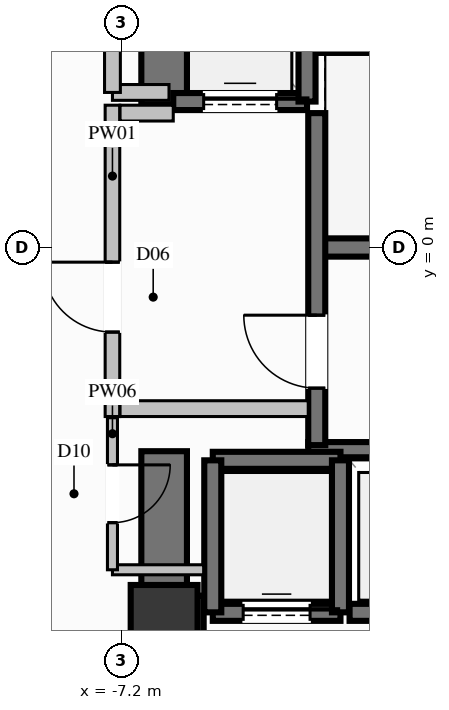
"""IFC4 building model, lengths in metres.
Left out: names, types, materials, properties, quantities, classifications, styles, units other than length and angle.
Written with IfcOpenShell. Run it as: python <this file> out.ifc"""

import sys

from ifc_helpers import new_model, si_unit, direction, frame, frame_2d, origin, origin_2d, place, context, subcontext, project, spatial, rectangle, extrude, element, fill, save


model = new_model("IFC4")
c1 = context("Model", 3, precision=1e-05, world=origin(), true_north=direction((0.0, 1.0)))
c2 = subcontext(c1, "Body", "Model", "MODEL_VIEW")
j1 = project(units=[si_unit("LENGTHUNIT", "METRE"), si_unit("PLANEANGLEUNIT", "RADIAN")], contexts=[c1])
p1 = place(None, origin())
s1 = spatial("IfcSite", under=j1, at=p1, CompositionType="ELEMENT")
p2 = place(p1, origin())
s2 = spatial("IfcBuilding", under=s1, at=p2, CompositionType="ELEMENT")
p3 = place(p2, frame((0.0, 0.0, 57.2)))
s3 = spatial("IfcBuildingStorey", under=s2, at=p3, CompositionType="ELEMENT", Elevation=57.2)
p4 = place(p3, frame((-6.5, -6.1, 0.0), z_axis=(0.0, 0.0, 1.0), x_axis=(1.0, 0.0, 0.0)))
e1 = element("IfcColumn", 1, at=p4, inside=s3, PredefinedType="COLUMN", context=c2, shape_type="SweptSolid", body=[
    extrude(rectangle(XDim=1.1, YDim=1.1, at=origin_2d()), origin(), (0.0, 0.0, 1.0), 3.6),
])
p5 = place(p3, frame((-3.99, 0.0, 0.0), z_axis=(0.0, 0.0, 1.0), x_axis=(1.0, 0.0, 0.0)))
e2 = element("IfcWall", 2, at=p5, inside=s3, PredefinedType="SHEAR", context=c2, shape_type="SweptSolid", body=[
    extrude(rectangle(XDim=7.98, YDim=0.3, at=frame_2d((3.99, 0.0))), origin(), (0.0, 0.0, 1.0), 3.6),
])
for number, where, z_axis, x_axis in (
    (3, (-4.13, -3.325, 0.0), (0.0, 0.0, 1.0), (1.0, 0.0, 0.0)),
    (4, (-4.13, 3.325, 0.0), (0.0, 0.0, 1.0), (1.0, 0.0, 0.0)),
):
    element("IfcWall", number, at=place(p3, frame(where, z_axis=z_axis, x_axis=x_axis)), inside=s3, PredefinedType="SOLIDWALL", context=c2, shape_type="SweptSolid", body=[
        extrude(rectangle(XDim=8.26, YDim=0.25, at=frame_2d((4.13, 0.0))), origin(), (0.0, 0.0, 1.0), 3.6),
    ])
p6 = place(p3, frame((-6.125, -6.1, 0.0), z_axis=(0.0, 0.0, 1.0), x_axis=(1.0, 0.0, 0.0)))
e5 = element("IfcWall", 5, at=p6, inside=s3, PredefinedType="SHEAR", context=c2, shape_type="SweptSolid", body=[
    extrude(rectangle(XDim=0.275, YDim=0.75, at=frame_2d((0.137, 0.0))), origin(), (0.0, 0.0, 1.0), 3.6),
])
p7 = place(p3, frame((-6.5, 2.35, 0.0), z_axis=(0.0, 0.0, 1.0), x_axis=(0.0, 1.0, 0.0)))
e6 = element("IfcWall", 6, at=p7, inside=s3, PredefinedType="SHEAR", context=c2, shape_type="SweptSolid", body=[
    extrude(rectangle(XDim=4.125, YDim=0.75, at=frame_2d((2.062, 0.0))), origin(), (0.0, 0.0, 1.0), 3.6),
])
p8 = place(p3, frame((-6.5, -6.475, 0.0), z_axis=(0.0, 0.0, 1.0), x_axis=(0.0, 1.0, 0.0)))
e7 = element("IfcWall", 7, at=p8, inside=s3, PredefinedType="SHEAR", context=c2, shape_type="SweptSolid", body=[
    extrude(rectangle(XDim=3.125, YDim=0.75, at=frame_2d((1.562, 0.0))), origin(), (0.0, 0.0, 1.0), 3.6),
])
p9 = place(p3, frame((-5.7, -6.0, 0.0), z_axis=(0.0, 0.0, 1.0), x_axis=(1.0, 0.0, 0.0)))
e8 = element("IfcWall", 8, at=p9, inside=s3, PredefinedType="SOLIDWALL", context=c2, shape_type="SweptSolid", body=[
    extrude(rectangle(XDim=2.1, YDim=0.28, at=frame_2d((1.05, 0.0))), origin(), (0.0, 0.0, 1.0), 3.34),
])
p10 = place(p9, frame((0.5, 0.0, 0.0)))
e9 = element("IfcOpeningElement", 9, at=p10, cuts=e8, PredefinedType="OPENING", context=c2, shape_type="SweptSolid", body=[
    extrude(rectangle(XDim=1.1, YDim=2.2, at=frame_2d((0.55, 1.1))), frame((0.0, 0.15, 0.0), z_axis=(0.0, -1.0, 0.0), x_axis=(1.0, 0.0, 0.0)), (0.0, 0.0, 1.0), 0.3),
])
p11 = place(p3, frame((-3.6, -3.5, 0.0), z_axis=(0.0, 0.0, 1.0), x_axis=(-1.0, 0.0, 0.0)))
e10 = element("IfcWall", 10, at=p11, inside=s3, PredefinedType="SOLIDWALL", context=c2, shape_type="SweptSolid", body=[
    extrude(rectangle(XDim=2.1, YDim=0.28, at=frame_2d((1.05, 0.0))), origin(), (0.0, 0.0, 1.0), 3.34),
])
for number, where, z_axis, x_axis in (
    (11, (-5.7, -3.5, 0.0), (0.0, 0.0, 1.0), (0.0, -1.0, 0.0)),
    (12, (-3.6, -6.0, 0.0), (0.0, 0.0, 1.0), (0.0, 1.0, 0.0)),
):
    element("IfcWall", number, at=place(p3, frame(where, z_axis=z_axis, x_axis=x_axis)), inside=s3, PredefinedType="SOLIDWALL", context=c2, shape_type="SweptSolid", body=[
        extrude(rectangle(XDim=2.5, YDim=0.28, at=frame_2d((1.25, 0.0))), origin(), (0.0, 0.0, 1.0), 3.34),
    ])
p12 = place(p3, frame((-3.45, -6.0, 0.0), z_axis=(0.0, 0.0, 1.0), x_axis=(1.0, 0.0, 0.0)))
e13 = element("IfcWall", 13, at=p12, inside=s3, PredefinedType="SOLIDWALL", context=c2, shape_type="SweptSolid", body=[
    extrude(rectangle(XDim=2.1, YDim=0.28, at=frame_2d((1.05, 0.0))), origin(), (0.0, 0.0, 1.0), 3.34),
])
p13 = place(p12, frame((0.5, 0.0, 0.0)))
e14 = element("IfcOpeningElement", 14, at=p13, cuts=e13, PredefinedType="OPENING", context=c2, shape_type="SweptSolid", body=[
    extrude(rectangle(XDim=1.1, YDim=2.2, at=frame_2d((0.55, 1.1))), frame((0.0, 0.15, 0.0), z_axis=(0.0, -1.0, 0.0), x_axis=(1.0, 0.0, 0.0)), (0.0, 0.0, 1.0), 0.3),
])
p14 = place(p3, frame((-6.35, 2.4, 0.0), z_axis=(0.0, 0.0, 1.0), x_axis=(1.0, 0.0, 0.0)))
e15 = element("IfcWall", 15, at=p14, inside=s3, PredefinedType="SOLIDWALL", context=c2, shape_type="SweptSolid", body=[
    extrude(rectangle(XDim=2.2, YDim=0.28, at=frame_2d((1.1, 0.0))), origin(), (0.0, 0.0, 1.0), 3.34),
])
p15 = place(p14, frame((0.5, 0.0, 0.0)))
e16 = element("IfcOpeningElement", 16, at=p15, cuts=e15, PredefinedType="OPENING", context=c2, shape_type="SweptSolid", body=[
    extrude(rectangle(XDim=1.2, YDim=2.2, at=frame_2d((0.6, 1.1))), frame((0.0, 0.15, 0.0), z_axis=(0.0, -1.0, 0.0), x_axis=(1.0, 0.0, 0.0)), (0.0, 0.0, 1.0), 0.3),
])
p16 = place(p3, frame((-4.15, 2.4, 0.0), z_axis=(0.0, 0.0, 1.0), x_axis=(0.0, 1.0, 0.0)))
e17 = element("IfcWall", 17, at=p16, inside=s3, PredefinedType="SOLIDWALL", context=c2, shape_type="SweptSolid", body=[
    extrude(rectangle(XDim=2.7, YDim=0.28, at=frame_2d((1.35, 0.0))), origin(), (0.0, 0.0, 1.0), 3.34),
])
p17 = place(p3, frame((-3.99, -3.25, 0.0), z_axis=(0.0, 0.0, 1.0), x_axis=(0.0, 1.0, 0.0)))
e18 = element("IfcWall", 18, at=p17, inside=s3, PredefinedType="SOLIDWALL", context=c2, shape_type="SweptSolid", body=[
    extrude(rectangle(XDim=5.46, YDim=0.28, at=frame_2d((2.73, 0.0))), origin(), (0.0, 0.0, 1.0), 3.34),
])
p18 = place(p17, frame((0.937, 0.0, 0.0)))
e19 = element("IfcOpeningElement", 19, at=p18, cuts=e18, PredefinedType="OPENING", context=c2, shape_type="SweptSolid", body=[
    extrude(rectangle(XDim=1.2, YDim=2.2, at=frame_2d((0.6, 1.1))), frame((0.0, 0.15, 0.0), z_axis=(0.0, -1.0, 0.0), x_axis=(1.0, 0.0, 0.0)), (0.0, 0.0, 1.0), 0.3),
])
p19 = place(p3, frame((-7.35, -2.78, 0.0), z_axis=(0.0, 0.0, 1.0), x_axis=(0.0, 1.0, 0.0)))
e20 = element("IfcWall", 20, at=p19, inside=s3, PredefinedType="PARTITIONING", context=c2, shape_type="SweptSolid", body=[
    extrude(rectangle(XDim=5.12, YDim=0.24, at=frame_2d((2.56, 0.0))), origin(), (0.0, 0.0, 1.0), 2.425),
])
p20 = place(p19, frame((1.389, 0.0, 0.0)))
e21 = element("IfcOpeningElement", 21, at=p20, cuts=e20, PredefinedType="OPENING", context=c2, shape_type="SweptSolid", body=[
    extrude(rectangle(XDim=1.15, YDim=2.2, at=frame_2d((0.575, 1.1))), frame((0.0, 0.13, 0.0), z_axis=(0.0, -1.0, 0.0), x_axis=(1.0, 0.0, 0.0)), (0.0, 0.0, 1.0), 0.26),
])
p21 = place(p3, frame((-7.225, -2.65, 0.0), z_axis=(0.0, 0.0, 1.0), x_axis=(1.0, 0.0, 0.0)))
e22 = element("IfcWall", 22, at=p21, inside=s3, PredefinedType="PARTITIONING", context=c2, shape_type="SweptSolid", body=[
    extrude(rectangle(XDim=3.095, YDim=0.26, at=frame_2d((1.548, 0.0))), origin(), (0.0, 0.0, 1.0), 3.34),
])
p22 = place(p3, frame((-7.225, 2.21, 0.0), z_axis=(0.0, 0.0, 1.0), x_axis=(1.0, 0.0, 0.0)))
e23 = element("IfcWall", 23, at=p22, inside=s3, PredefinedType="PARTITIONING", context=c2, shape_type="SweptSolid", body=[
    extrude(rectangle(XDim=0.875, YDim=0.26, at=frame_2d((0.438, 0.0))), origin(), (0.0, 0.0, 1.0), 3.34),
])
p23 = place(p3, frame((-7.35, 2.55, 0.0), z_axis=(0.0, 0.0, 1.0), x_axis=(1.0, 0.0, 0.0)))
e24 = element("IfcWall", 24, at=p23, inside=s3, PredefinedType="PARTITIONING", context=c2, shape_type="SweptSolid", body=[
    extrude(rectangle(XDim=0.93, YDim=0.26, at=frame_2d((0.465, 0.0))), origin(), (0.0, 0.0, 1.0), 3.34),
])
p24 = place(p3, frame((-7.35, 2.55, 0.0), z_axis=(0.0, 0.0, 1.0), x_axis=(0.0, 1.0, 0.0)))
e25 = element("IfcWall", 25, at=p24, inside=s3, PredefinedType="PARTITIONING", context=c2, shape_type="SweptSolid", body=[
    extrude(rectangle(XDim=2.4, YDim=0.26, at=frame_2d((1.2, 0.0))), origin(), (0.0, 0.0, 1.0), 2.425),
])
p25 = place(p24, frame((0.775, 0.0, 0.0)))
e26 = element("IfcOpeningElement", 26, at=p25, cuts=e25, PredefinedType="OPENING", context=c2, shape_type="SweptSolid", body=[
    extrude(rectangle(XDim=0.85, YDim=2.05, at=frame_2d((0.425, 1.025))), frame((0.0, 0.14, 0.0), z_axis=(0.0, -1.0, 0.0), x_axis=(1.0, 0.0, 0.0)), (0.0, 0.0, 1.0), 0.28),
])
p26 = place(p3, frame((-7.35, -5.3, 0.0), z_axis=(0.0, 0.0, 1.0), x_axis=(1.0, 0.0, 0.0)))
e27 = element("IfcWall", 27, at=p26, inside=s3, PredefinedType="PARTITIONING", context=c2, shape_type="SweptSolid", body=[
    extrude(rectangle(XDim=1.5, YDim=0.165, at=frame_2d((0.75, 0.0))), origin(), (0.0, 0.0, 1.0), 2.425),
])
p27 = place(p3, frame((-7.35, -2.8, 0.0), z_axis=(0.0, 0.0, 1.0), x_axis=(0.0, -1.0, 0.0)))
e28 = element("IfcWall", 28, at=p27, inside=s3, PredefinedType="PARTITIONING", context=c2, shape_type="SweptSolid", body=[
    extrude(rectangle(XDim=2.5, YDim=0.165, at=frame_2d((1.25, 0.0))), origin(), (0.0, 0.0, 1.0), 3.34),
])
p28 = place(p27, frame((0.775, 0.0, 0.0)))
e29 = element("IfcOpeningElement", 29, at=p28, cuts=e28, PredefinedType="OPENING", context=c2, shape_type="SweptSolid", body=[
    extrude(rectangle(XDim=0.95, YDim=2.1, at=frame_2d((0.475, 1.05))), frame((0.0, 0.093, 0.0), z_axis=(0.0, -1.0, 0.0), x_axis=(1.0, 0.0, 0.0)), (0.0, 0.0, 1.0), 0.185),
])
p29 = place(p10, origin())
e30 = element("IfcDoor", 30, at=p29, inside=s3, OperationType="SLIDING_TO_LEFT", PredefinedType="DOOR", context=c2, shape_type="SweptSolid", body=[
    extrude(rectangle(XDim=1.1, YDim=2.2, at=frame_2d((0.55, 1.1))), frame((0.0, 0.025, 0.0), z_axis=(0.0, -1.0, 0.0), x_axis=(1.0, 0.0, 0.0)), (0.0, 0.0, 1.0), 0.05),
])
fill(e9, e30)
p30 = place(p15, origin())
e31 = element("IfcDoor", 31, at=p30, inside=s3, OperationType="SLIDING_TO_LEFT", PredefinedType="DOOR", context=c2, shape_type="SweptSolid", body=[
    extrude(rectangle(XDim=1.2, YDim=2.2, at=frame_2d((0.6, 1.1))), frame((0.0, 0.025, 0.0), z_axis=(0.0, -1.0, 0.0), x_axis=(1.0, 0.0, 0.0)), (0.0, 0.0, 1.0), 0.05),
])
fill(e16, e31)
p31 = place(p18, origin())
e32 = element("IfcDoor", 32, at=p31, inside=s3, OperationType="SINGLE_SWING_RIGHT", PredefinedType="DOOR", context=c2, shape_type="SweptSolid", body=[
    extrude(rectangle(XDim=1.2, YDim=2.2, at=frame_2d((0.6, 1.1))), frame((0.0, 0.025, 0.0), z_axis=(0.0, -1.0, 0.0), x_axis=(1.0, 0.0, 0.0)), (0.0, 0.0, 1.0), 0.05),
])
fill(e19, e32)
p32 = place(p20, origin())
e33 = element("IfcDoor", 33, at=p32, inside=s3, OperationType="SINGLE_SWING_RIGHT", PredefinedType="DOOR", context=c2, shape_type="SweptSolid", body=[
    extrude(rectangle(XDim=1.15, YDim=2.2, at=frame_2d((0.575, 1.1))), frame((0.0, 0.025, 0.0), z_axis=(0.0, -1.0, 0.0), x_axis=(1.0, 0.0, 0.0)), (0.0, 0.0, 1.0), 0.05),
])
fill(e21, e33)
p33 = place(p28, origin())
e34 = element("IfcDoor", 34, at=p33, inside=s3, OperationType="SINGLE_SWING_LEFT", PredefinedType="DOOR", context=c2, shape_type="SweptSolid", body=[
    extrude(rectangle(XDim=0.95, YDim=2.1, at=frame_2d((0.475, 1.05))), frame((0.0, 0.025, 0.0), z_axis=(0.0, -1.0, 0.0), x_axis=(1.0, 0.0, 0.0)), (0.0, 0.0, 1.0), 0.05),
])
fill(e29, e34)
save(model, sys.argv[1])
